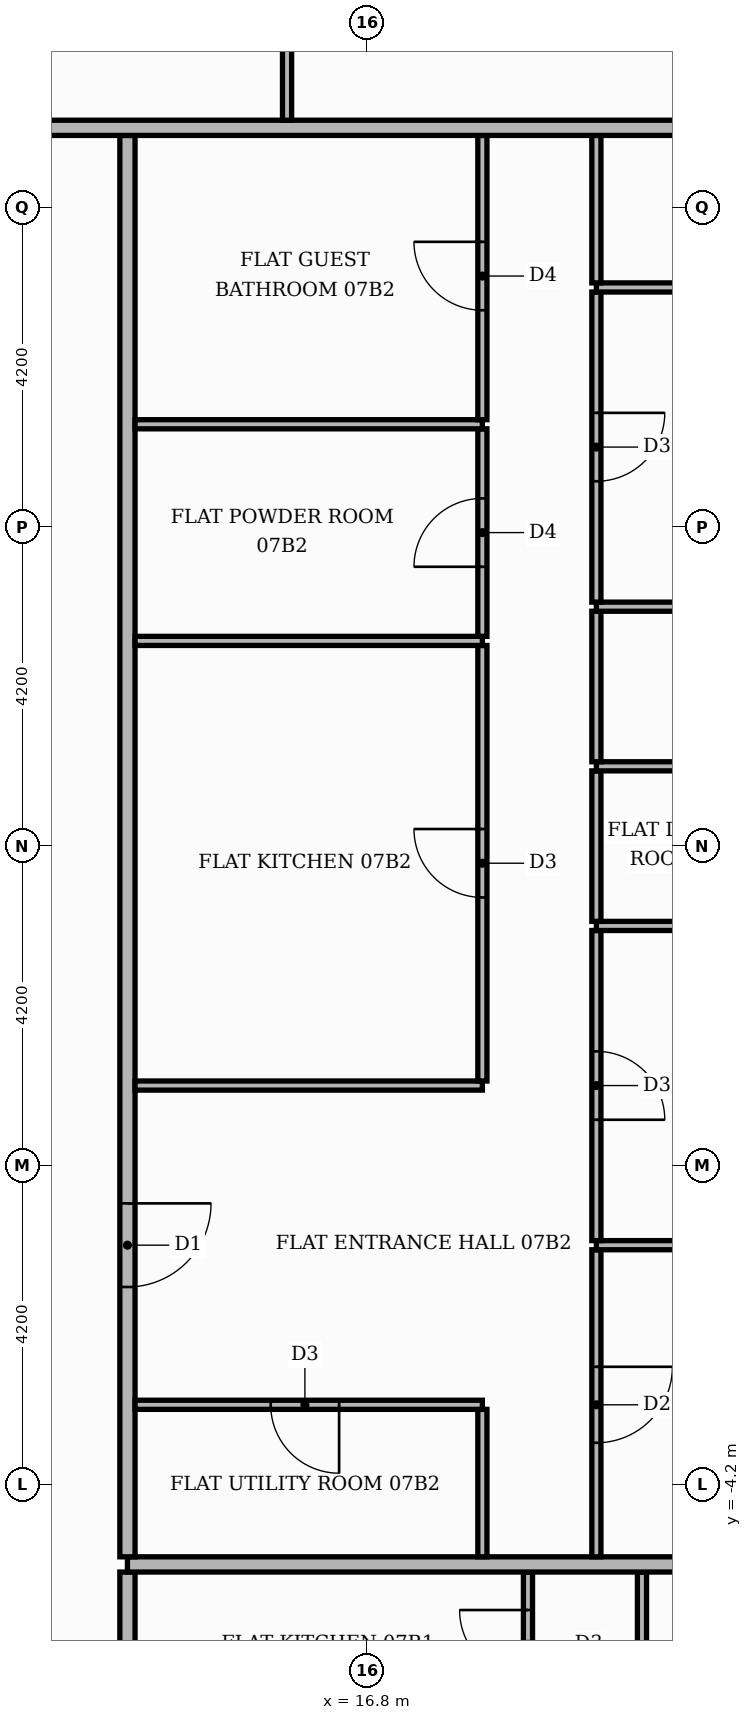
"""IFC4 building model, lengths in metres.
Left out: names, types, materials, properties, quantities, classifications, styles, units other than length and angle.
Written with IfcOpenShell. Run it as: python <this file> out.ifc"""

import sys

from ifc_helpers import new_model, si_unit, direction, frame, frame_2d, origin, place, context, subcontext, project, spatial, rectangle, extrude, element, fill, save


model = new_model("IFC4")
c1 = context("Model", 3, precision=1e-05, world=origin(), true_north=direction((0.0, 1.0)))
c2 = subcontext(c1, "Body", "Model", "MODEL_VIEW")
j1 = project(units=[si_unit("LENGTHUNIT", "METRE"), si_unit("PLANEANGLEUNIT", "RADIAN")], contexts=[c1])
p1 = place(None, origin())
s1 = spatial("IfcSite", under=j1, at=p1, CompositionType="ELEMENT")
p2 = place(p1, origin())
s2 = spatial("IfcBuilding", under=s1, at=p2, CompositionType="ELEMENT")
p3 = place(p2, frame((0.0, 0.0, 34.8)))
s3 = spatial("IfcBuildingStorey", under=s2, at=p3, CompositionType="ELEMENT", Elevation=34.8)
p4 = place(p3, frame((13.65, -13.55, 0.0), z_axis=(0.0, 0.0, 1.0), x_axis=(0.0, 1.0, 0.0)))
e1 = element("IfcWall", 1, at=p4, inside=s3, PredefinedType="PARTITIONING", context=c2, shape_type="SweptSolid", body=[
    extrude(rectangle(XDim=8.2, YDim=0.2, at=frame_2d((4.1, 0.0))), origin(), (0.0, 0.0, 1.0), 3.48),
])
p5 = place(p4, frame((1.45, 0.0, 0.0)))
e2 = element("IfcOpeningElement", 2, at=p5, cuts=e1, PredefinedType="OPENING", context=c2, shape_type="SweptSolid", body=[
    extrude(rectangle(XDim=1.1, YDim=2.4, at=frame_2d((0.55, 1.2))), frame((0.0, 0.11, 0.0), z_axis=(0.0, -1.0, 0.0), x_axis=(1.0, 0.0, 0.0)), (0.0, 0.0, 1.0), 0.22),
])
p6 = place(p3, frame((18.92, -7.29, 0.0), z_axis=(0.0, 0.0, 1.0), x_axis=(0.0, 1.0, 0.0)))
e3 = element("IfcWall", 3, at=p6, inside=s3, PredefinedType="PARTITIONING", context=c2, shape_type="SweptSolid", body=[
    extrude(rectangle(XDim=1.94, YDim=0.12, at=frame_2d((0.97, 0.0))), origin(), (0.0, 0.0, 1.0), 3.48),
])
p7 = place(p6, frame((0.54, 0.0, 0.0)))
e4 = element("IfcOpeningElement", 4, at=p7, cuts=e3, PredefinedType="OPENING", context=c2, shape_type="SweptSolid", body=[
    extrude(rectangle(XDim=0.9, YDim=2.1, at=frame_2d((0.45, 1.05))), frame((0.0, 0.07, 0.0), z_axis=(0.0, -1.0, 0.0), x_axis=(1.0, 0.0, 0.0)), (0.0, 0.0, 1.0), 0.14),
])
p8 = place(p3, frame((20.42, -7.29, 0.0), z_axis=(0.0, 0.0, 1.0), x_axis=(0.0, 1.0, 0.0)))
e5 = element("IfcWall", 5, at=p8, inside=s3, PredefinedType="PARTITIONING", context=c2, shape_type="SweptSolid", body=[
    extrude(rectangle(XDim=1.94, YDim=0.12, at=frame_2d((0.97, 0.0))), origin(), (0.0, 0.0, 1.0), 3.48),
])
p9 = place(p3, frame((13.65, -5.25, 0.0), z_axis=(0.0, 0.0, 1.0), x_axis=(1.0, 0.0, 0.0)))
e6 = element("IfcWall", 6, at=p9, inside=s3, PredefinedType="PARTITIONING", context=c2, shape_type="SweptSolid", body=[
    extrude(rectangle(XDim=11.77, YDim=0.2, at=frame_2d((5.885, 0.0))), origin(), (0.0, 0.0, 1.0), 3.48),
])
p10 = place(p3, frame((13.65, -5.15, 0.0), z_axis=(0.0, 0.0, 1.0), x_axis=(0.0, 1.0, 0.0)))
e7 = element("IfcWall", 7, at=p10, inside=s3, PredefinedType="PARTITIONING", context=c2, shape_type="SweptSolid", body=[
    extrude(rectangle(XDim=18.7, YDim=0.2, at=frame_2d((9.35, 0.0))), origin(), (0.0, 0.0, 1.0), 3.48),
])
p11 = place(p10, frame((3.55, 0.0, 0.0)))
e8 = element("IfcOpeningElement", 8, at=p11, cuts=e7, PredefinedType="OPENING", context=c2, shape_type="SweptSolid", body=[
    extrude(rectangle(XDim=1.1, YDim=2.4, at=frame_2d((0.55, 1.2))), frame((0.0, 0.11, 0.0), z_axis=(0.0, -1.0, 0.0), x_axis=(1.0, 0.0, 0.0)), (0.0, 0.0, 1.0), 0.22),
])
p12 = place(p3, frame((18.32, -5.15, 0.0), z_axis=(0.0, 0.0, 1.0), x_axis=(0.0, 1.0, 0.0)))
e9 = element("IfcWall", 9, at=p12, inside=s3, PredefinedType="PARTITIONING", context=c2, shape_type="SweptSolid", body=[
    extrude(rectangle(XDim=1.94, YDim=0.12, at=frame_2d((0.97, 0.0))), origin(), (0.0, 0.0, 1.0), 3.48),
])
p13 = place(p3, frame((19.82, -5.15, 0.0), z_axis=(0.0, 0.0, 1.0), x_axis=(0.0, 1.0, 0.0)))
e10 = element("IfcWall", 10, at=p13, inside=s3, PredefinedType="PARTITIONING", context=c2, shape_type="SweptSolid", body=[
    extrude(rectangle(XDim=4.04, YDim=0.12, at=frame_2d((2.02, 0.0))), origin(), (0.0, 0.0, 1.0), 3.48),
])
p14 = place(p13, frame((1.5, 0.0, 0.0)))
e11 = element("IfcOpeningElement", 11, at=p14, cuts=e10, PredefinedType="OPENING", context=c2, shape_type="SweptSolid", body=[
    extrude(rectangle(XDim=1.0, YDim=2.1, at=frame_2d((0.5, 1.05))), frame((0.0, 0.07, 0.0), z_axis=(0.0, -1.0, 0.0), x_axis=(1.0, 0.0, 0.0)), (0.0, 0.0, 1.0), 0.14),
])
p15 = place(p3, frame((13.75, -3.15, 0.0), z_axis=(0.0, 0.0, 1.0), x_axis=(1.0, 0.0, 0.0)))
e12 = element("IfcWall", 12, at=p15, inside=s3, PredefinedType="PARTITIONING", context=c2, shape_type="SweptSolid", body=[
    extrude(rectangle(XDim=4.57, YDim=0.12, at=frame_2d((2.285, 0.0))), origin(), (0.0, 0.0, 1.0), 3.48),
])
p16 = place(p15, frame((1.785, 0.0, 0.0)))
e13 = element("IfcOpeningElement", 13, at=p16, cuts=e12, PredefinedType="OPENING", context=c2, shape_type="SweptSolid", body=[
    extrude(rectangle(XDim=0.9, YDim=2.1, at=frame_2d((0.45, 1.05))), frame((0.0, 0.07, 0.0), z_axis=(0.0, -1.0, 0.0), x_axis=(1.0, 0.0, 0.0)), (0.0, 0.0, 1.0), 0.14),
])
p17 = place(p3, frame((19.82, -1.05, 0.0), z_axis=(0.0, 0.0, 1.0), x_axis=(1.0, 0.0, 0.0)))
e14 = element("IfcWall", 14, at=p17, inside=s3, PredefinedType="PARTITIONING", context=c2, shape_type="SweptSolid", body=[
    extrude(rectangle(XDim=5.6, YDim=0.12, at=frame_2d((2.8, 0.0))), origin(), (0.0, 0.0, 1.0), 3.48),
])
p18 = place(p3, frame((19.82, -0.99, 0.0), z_axis=(0.0, 0.0, 1.0), x_axis=(0.0, 1.0, 0.0)))
e15 = element("IfcWall", 15, at=p18, inside=s3, PredefinedType="PARTITIONING", context=c2, shape_type="SweptSolid", body=[
    extrude(rectangle(XDim=4.08, YDim=0.12, at=frame_2d((2.04, 0.0))), origin(), (0.0, 0.0, 1.0), 3.48),
])
p19 = place(p18, frame((1.59, 0.0, 0.0)))
e16 = element("IfcOpeningElement", 16, at=p19, cuts=e15, PredefinedType="OPENING", context=c2, shape_type="SweptSolid", body=[
    extrude(rectangle(XDim=0.9, YDim=2.1, at=frame_2d((0.45, 1.05))), frame((0.0, 0.07, 0.0), z_axis=(0.0, -1.0, 0.0), x_axis=(1.0, 0.0, 0.0)), (0.0, 0.0, 1.0), 0.14),
])
p20 = place(p3, frame((13.75, 1.05, 0.0), z_axis=(0.0, 0.0, 1.0), x_axis=(1.0, 0.0, 0.0)))
e17 = element("IfcWall", 17, at=p20, inside=s3, PredefinedType="PARTITIONING", context=c2, shape_type="SweptSolid", body=[
    extrude(rectangle(XDim=4.57, YDim=0.12, at=frame_2d((2.285, 0.0))), origin(), (0.0, 0.0, 1.0), 3.48),
])
p21 = place(p3, frame((18.32, 1.11, 0.0), z_axis=(0.0, 0.0, 1.0), x_axis=(0.0, 1.0, 0.0)))
e18 = element("IfcWall", 18, at=p21, inside=s3, PredefinedType="PARTITIONING", context=c2, shape_type="SweptSolid", body=[
    extrude(rectangle(XDim=5.73, YDim=0.12, at=frame_2d((2.865, 0.0))), origin(), (0.0, 0.0, 1.0), 3.48),
])
p22 = place(p21, frame((2.415, 0.0, 0.0)))
e19 = element("IfcOpeningElement", 19, at=p22, cuts=e18, PredefinedType="OPENING", context=c2, shape_type="SweptSolid", body=[
    extrude(rectangle(XDim=0.9, YDim=2.1, at=frame_2d((0.45, 1.05))), frame((0.0, 0.07, 0.0), z_axis=(0.0, -1.0, 0.0), x_axis=(1.0, 0.0, 0.0)), (0.0, 0.0, 1.0), 0.14),
])
p23 = place(p3, frame((19.82, 3.15, 0.0), z_axis=(0.0, 0.0, 1.0), x_axis=(1.0, 0.0, 0.0)))
e20 = element("IfcWall", 20, at=p23, inside=s3, PredefinedType="PARTITIONING", context=c2, shape_type="SweptSolid", body=[
    extrude(rectangle(XDim=5.6, YDim=0.12, at=frame_2d((2.8, 0.0))), origin(), (0.0, 0.0, 1.0), 3.48),
])
p24 = place(p23, frame((2.5, 0.0, 0.0)))
e21 = element("IfcOpeningElement", 21, at=p24, cuts=e20, PredefinedType="OPENING", context=c2, shape_type="SweptSolid", body=[
    extrude(rectangle(XDim=0.9, YDim=2.1, at=frame_2d((0.45, 1.05))), frame((0.0, 0.07, 0.0), z_axis=(0.0, -1.0, 0.0), x_axis=(1.0, 0.0, 0.0)), (0.0, 0.0, 1.0), 0.14),
])
p25 = place(p3, frame((19.82, 3.21, 0.0), z_axis=(0.0, 0.0, 1.0), x_axis=(0.0, 1.0, 0.0)))
e22 = element("IfcWall", 22, at=p25, inside=s3, PredefinedType="PARTITIONING", context=c2, shape_type="SweptSolid", body=[
    extrude(rectangle(XDim=1.98, YDim=0.12, at=frame_2d((0.99, 0.0))), origin(), (0.0, 0.0, 1.0), 3.48),
])
p26 = place(p3, frame((19.82, 5.25, 0.0), z_axis=(0.0, 0.0, 1.0), x_axis=(1.0, 0.0, 0.0)))
e23 = element("IfcWall", 23, at=p26, inside=s3, PredefinedType="PARTITIONING", context=c2, shape_type="SweptSolid", body=[
    extrude(rectangle(XDim=5.6, YDim=0.12, at=frame_2d((2.8, 0.0))), origin(), (0.0, 0.0, 1.0), 3.48),
])
p27 = place(p26, frame((2.5, 0.0, 0.0)))
e24 = element("IfcOpeningElement", 24, at=p27, cuts=e23, PredefinedType="OPENING", context=c2, shape_type="SweptSolid", body=[
    extrude(rectangle(XDim=0.9, YDim=2.1, at=frame_2d((0.45, 1.05))), frame((0.0, 0.07, 0.0), z_axis=(0.0, -1.0, 0.0), x_axis=(1.0, 0.0, 0.0)), (0.0, 0.0, 1.0), 0.14),
])
p28 = place(p3, frame((19.82, 5.31, 0.0), z_axis=(0.0, 0.0, 1.0), x_axis=(0.0, 1.0, 0.0)))
e25 = element("IfcWall", 25, at=p28, inside=s3, PredefinedType="PARTITIONING", context=c2, shape_type="SweptSolid", body=[
    extrude(rectangle(XDim=1.98, YDim=0.12, at=frame_2d((0.99, 0.0))), origin(), (0.0, 0.0, 1.0), 3.48),
])
p29 = place(p3, frame((13.75, 6.9, 0.0), z_axis=(0.0, 0.0, 1.0), x_axis=(1.0, 0.0, 0.0)))
e26 = element("IfcWall", 26, at=p29, inside=s3, PredefinedType="PARTITIONING", context=c2, shape_type="SweptSolid", body=[
    extrude(rectangle(XDim=4.57, YDim=0.12, at=frame_2d((2.285, 0.0))), origin(), (0.0, 0.0, 1.0), 3.48),
])
p30 = place(p3, frame((18.32, 6.96, 0.0), z_axis=(0.0, 0.0, 1.0), x_axis=(0.0, 1.0, 0.0)))
e27 = element("IfcWall", 27, at=p30, inside=s3, PredefinedType="PARTITIONING", context=c2, shape_type="SweptSolid", body=[
    extrude(rectangle(XDim=2.73, YDim=0.12, at=frame_2d((1.365, 0.0))), origin(), (0.0, 0.0, 1.0), 3.48),
])
p31 = place(p30, frame((0.915, 0.0, 0.0)))
e28 = element("IfcOpeningElement", 28, at=p31, cuts=e27, PredefinedType="OPENING", context=c2, shape_type="SweptSolid", body=[
    extrude(rectangle(XDim=0.9, YDim=2.1, at=frame_2d((0.45, 1.05))), frame((0.0, 0.07, 0.0), z_axis=(0.0, -1.0, 0.0), x_axis=(1.0, 0.0, 0.0)), (0.0, 0.0, 1.0), 0.14),
])
p32 = place(p3, frame((19.82, 7.35, 0.0), z_axis=(0.0, 0.0, 1.0), x_axis=(1.0, 0.0, 0.0)))
e29 = element("IfcWall", 29, at=p32, inside=s3, PredefinedType="PARTITIONING", context=c2, shape_type="SweptSolid", body=[
    extrude(rectangle(XDim=5.6, YDim=0.12, at=frame_2d((2.8, 0.0))), origin(), (0.0, 0.0, 1.0), 3.48),
])
p33 = place(p3, frame((19.82, 7.41, 0.0), z_axis=(0.0, 0.0, 1.0), x_axis=(0.0, 1.0, 0.0)))
e30 = element("IfcWall", 30, at=p33, inside=s3, PredefinedType="PARTITIONING", context=c2, shape_type="SweptSolid", body=[
    extrude(rectangle(XDim=4.08, YDim=0.12, at=frame_2d((2.04, 0.0))), origin(), (0.0, 0.0, 1.0), 3.48),
])
p34 = place(p33, frame((1.59, 0.0, 0.0)))
e31 = element("IfcOpeningElement", 31, at=p34, cuts=e30, PredefinedType="OPENING", context=c2, shape_type="SweptSolid", body=[
    extrude(rectangle(XDim=0.9, YDim=2.1, at=frame_2d((0.45, 1.05))), frame((0.0, 0.07, 0.0), z_axis=(0.0, -1.0, 0.0), x_axis=(1.0, 0.0, 0.0)), (0.0, 0.0, 1.0), 0.14),
])
p35 = place(p3, frame((13.75, 9.75, 0.0), z_axis=(0.0, 0.0, 1.0), x_axis=(1.0, 0.0, 0.0)))
e32 = element("IfcWall", 32, at=p35, inside=s3, PredefinedType="PARTITIONING", context=c2, shape_type="SweptSolid", body=[
    extrude(rectangle(XDim=4.57, YDim=0.12, at=frame_2d((2.285, 0.0))), origin(), (0.0, 0.0, 1.0), 3.48),
])
p36 = place(p3, frame((18.32, 9.81, 0.0), z_axis=(0.0, 0.0, 1.0), x_axis=(0.0, 1.0, 0.0)))
e33 = element("IfcWall", 33, at=p36, inside=s3, PredefinedType="PARTITIONING", context=c2, shape_type="SweptSolid", body=[
    extrude(rectangle(XDim=3.74, YDim=0.12, at=frame_2d((1.87, 0.0))), origin(), (0.0, 0.0, 1.0), 3.48),
])
p37 = place(p36, frame((1.44, 0.0, 0.0)))
e34 = element("IfcOpeningElement", 34, at=p37, cuts=e33, PredefinedType="OPENING", context=c2, shape_type="SweptSolid", body=[
    extrude(rectangle(XDim=0.9, YDim=2.1, at=frame_2d((0.45, 1.05))), frame((0.0, 0.07, 0.0), z_axis=(0.0, -1.0, 0.0), x_axis=(1.0, 0.0, 0.0)), (0.0, 0.0, 1.0), 0.14),
])
p38 = place(p3, frame((19.82, 11.55, 0.0), z_axis=(0.0, 0.0, 1.0), x_axis=(1.0, 0.0, 0.0)))
e35 = element("IfcWall", 35, at=p38, inside=s3, PredefinedType="PARTITIONING", context=c2, shape_type="SweptSolid", body=[
    extrude(rectangle(XDim=5.6, YDim=0.12, at=frame_2d((2.8, 0.0))), origin(), (0.0, 0.0, 1.0), 3.48),
])
p39 = place(p38, frame((2.5, 0.0, 0.0)))
e36 = element("IfcOpeningElement", 36, at=p39, cuts=e35, PredefinedType="OPENING", context=c2, shape_type="SweptSolid", body=[
    extrude(rectangle(XDim=0.9, YDim=2.1, at=frame_2d((0.45, 1.05))), frame((0.0, 0.07, 0.0), z_axis=(0.0, -1.0, 0.0), x_axis=(1.0, 0.0, 0.0)), (0.0, 0.0, 1.0), 0.14),
])
p40 = place(p3, frame((19.82, 11.61, 0.0), z_axis=(0.0, 0.0, 1.0), x_axis=(0.0, 1.0, 0.0)))
e37 = element("IfcWall", 37, at=p40, inside=s3, PredefinedType="PARTITIONING", context=c2, shape_type="SweptSolid", body=[
    extrude(rectangle(XDim=1.94, YDim=0.12, at=frame_2d((0.97, 0.0))), origin(), (0.0, 0.0, 1.0), 3.48),
])
p41 = place(p3, frame((-13.65, 13.65, 0.0), z_axis=(0.0, 0.0, 1.0), x_axis=(1.0, 0.0, 0.0)))
e38 = element("IfcWall", 38, at=p41, inside=s3, PredefinedType="PARTITIONING", context=c2, shape_type="SweptSolid", body=[
    extrude(rectangle(XDim=39.07, YDim=0.2, at=frame_2d((19.535, 0.0))), origin(), (0.0, 0.0, 1.0), 3.48),
])
p42 = place(p41, frame((24.65, 0.0, 0.0)))
e39 = element("IfcOpeningElement", 39, at=p42, cuts=e38, PredefinedType="OPENING", context=c2, shape_type="SweptSolid", body=[
    extrude(rectangle(XDim=1.1, YDim=2.4, at=frame_2d((0.55, 1.2))), frame((0.0, 0.11, 0.0), z_axis=(0.0, -1.0, 0.0), x_axis=(1.0, 0.0, 0.0)), (0.0, 0.0, 1.0), 0.22),
])
p43 = place(p41, frame((14.15, 0.0, 0.0)))
e40 = element("IfcOpeningElement", 40, at=p43, cuts=e38, PredefinedType="OPENING", context=c2, shape_type="SweptSolid", body=[
    extrude(rectangle(XDim=1.1, YDim=2.4, at=frame_2d((0.55, 1.2))), frame((0.0, 0.11, 0.0), z_axis=(0.0, -1.0, 0.0), x_axis=(1.0, 0.0, 0.0)), (0.0, 0.0, 1.0), 0.22),
])
p44 = place(p3, frame((15.75, 13.75, 0.0), z_axis=(0.0, 0.0, 1.0), x_axis=(0.0, 1.0, 0.0)))
e41 = element("IfcWall", 41, at=p44, inside=s3, PredefinedType="PARTITIONING", context=c2, shape_type="SweptSolid", body=[
    extrude(rectangle(XDim=6.01, YDim=0.12, at=frame_2d((3.005, 0.0))), origin(), (0.0, 0.0, 1.0), 3.48),
])
p45 = place(p44, frame((2.485, 0.0, 0.0)))
e42 = element("IfcOpeningElement", 42, at=p45, cuts=e41, PredefinedType="OPENING", context=c2, shape_type="SweptSolid", body=[
    extrude(rectangle(XDim=1.0, YDim=2.1, at=frame_2d((0.5, 1.05))), frame((0.0, 0.07, 0.0), z_axis=(0.0, -1.0, 0.0), x_axis=(1.0, 0.0, 0.0)), (0.0, 0.0, 1.0), 0.14),
])
p46 = place(p7, origin())
e43 = element("IfcDoor", 43, at=p46, inside=s3, OperationType="SINGLE_SWING_RIGHT", PredefinedType="DOOR", context=c2, shape_type="SweptSolid", body=[
    extrude(rectangle(XDim=0.9, YDim=2.1, at=frame_2d((0.45, 1.05))), frame((0.0, 0.025, 0.0), z_axis=(0.0, -1.0, 0.0), x_axis=(1.0, 0.0, 0.0)), (0.0, 0.0, 1.0), 0.05),
])
fill(e4, e43)
p47 = place(p11, frame((1.1, 0.0, 0.0), z_axis=(0.0, 0.0, 1.0), x_axis=(-1.0, 0.0, 0.0)))
e44 = element("IfcDoor", 44, at=p47, inside=s3, OperationType="SINGLE_SWING_RIGHT", PredefinedType="DOOR", context=c2, shape_type="SweptSolid", body=[
    extrude(rectangle(XDim=1.1, YDim=2.4, at=frame_2d((0.55, 1.2))), frame((0.0, 0.025, 0.0), z_axis=(0.0, -1.0, 0.0), x_axis=(1.0, 0.0, 0.0)), (0.0, 0.0, 1.0), 0.05),
])
fill(e8, e44)
p48 = place(p16, frame((0.9, 0.0, 0.0), z_axis=(0.0, 0.0, 1.0), x_axis=(-1.0, 0.0, 0.0)))
e45 = element("IfcDoor", 45, at=p48, inside=s3, OperationType="SINGLE_SWING_RIGHT", PredefinedType="DOOR", context=c2, shape_type="SweptSolid", body=[
    extrude(rectangle(XDim=0.9, YDim=2.1, at=frame_2d((0.45, 1.05))), frame((0.0, 0.025, 0.0), z_axis=(0.0, -1.0, 0.0), x_axis=(1.0, 0.0, 0.0)), (0.0, 0.0, 1.0), 0.05),
])
fill(e13, e45)
p49 = place(p22, origin())
e46 = element("IfcDoor", 46, at=p49, inside=s3, OperationType="SINGLE_SWING_RIGHT", PredefinedType="DOOR", context=c2, shape_type="SweptSolid", body=[
    extrude(rectangle(XDim=0.9, YDim=2.1, at=frame_2d((0.45, 1.05))), frame((0.0, 0.025, 0.0), z_axis=(0.0, -1.0, 0.0), x_axis=(1.0, 0.0, 0.0)), (0.0, 0.0, 1.0), 0.05),
])
fill(e19, e46)
p50 = place(p31, origin())
e47 = element("IfcDoor", 47, at=p50, inside=s3, OperationType="SINGLE_SWING_LEFT", PredefinedType="DOOR", context=c2, shape_type="SweptSolid", body=[
    extrude(rectangle(XDim=0.9, YDim=2.1, at=frame_2d((0.45, 1.05))), frame((0.0, 0.025, 0.0), z_axis=(0.0, -1.0, 0.0), x_axis=(1.0, 0.0, 0.0)), (0.0, 0.0, 1.0), 0.05),
])
fill(e28, e47)
p51 = place(p37, origin())
e48 = element("IfcDoor", 48, at=p51, inside=s3, OperationType="SINGLE_SWING_RIGHT", PredefinedType="DOOR", context=c2, shape_type="SweptSolid", body=[
    extrude(rectangle(XDim=0.9, YDim=2.1, at=frame_2d((0.45, 1.05))), frame((0.0, 0.025, 0.0), z_axis=(0.0, -1.0, 0.0), x_axis=(1.0, 0.0, 0.0)), (0.0, 0.0, 1.0), 0.05),
])
fill(e34, e48)
p52 = place(p14, frame((1.0, 0.0, 0.0), z_axis=(0.0, 0.0, 1.0), x_axis=(-1.0, 0.0, 0.0)))
e49 = element("IfcDoor", 49, at=p52, inside=s3, OperationType="SINGLE_SWING_RIGHT", PredefinedType="DOOR", context=c2, shape_type="SweptSolid", body=[
    extrude(rectangle(XDim=1.0, YDim=2.1, at=frame_2d((0.5, 1.05))), frame((0.0, 0.025, 0.0), z_axis=(0.0, -1.0, 0.0), x_axis=(1.0, 0.0, 0.0)), (0.0, 0.0, 1.0), 0.05),
])
fill(e11, e49)
p53 = place(p19, frame((0.9, 0.0, 0.0), z_axis=(0.0, 0.0, 1.0), x_axis=(-1.0, 0.0, 0.0)))
e50 = element("IfcDoor", 50, at=p53, inside=s3, OperationType="SINGLE_SWING_LEFT", PredefinedType="DOOR", context=c2, shape_type="SweptSolid", body=[
    extrude(rectangle(XDim=0.9, YDim=2.1, at=frame_2d((0.45, 1.05))), frame((0.0, 0.025, 0.0), z_axis=(0.0, -1.0, 0.0), x_axis=(1.0, 0.0, 0.0)), (0.0, 0.0, 1.0), 0.05),
])
fill(e16, e50)
p54 = place(p34, frame((0.9, 0.0, 0.0), z_axis=(0.0, 0.0, 1.0), x_axis=(-1.0, 0.0, 0.0)))
e51 = element("IfcDoor", 51, at=p54, inside=s3, OperationType="SINGLE_SWING_RIGHT", PredefinedType="DOOR", context=c2, shape_type="SweptSolid", body=[
    extrude(rectangle(XDim=0.9, YDim=2.1, at=frame_2d((0.45, 1.05))), frame((0.0, 0.025, 0.0), z_axis=(0.0, -1.0, 0.0), x_axis=(1.0, 0.0, 0.0)), (0.0, 0.0, 1.0), 0.05),
])
fill(e31, e51)
save(model, sys.argv[1])
